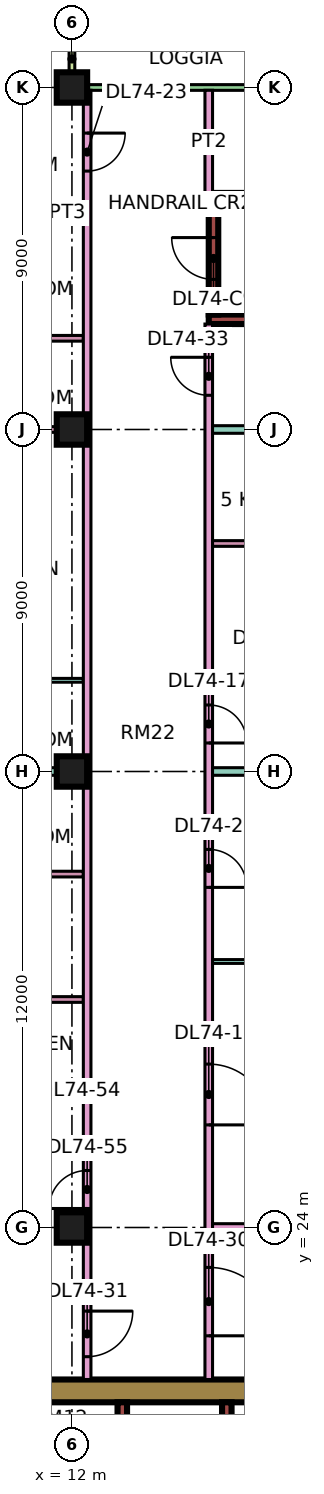
"""IFC4 building model, lengths in metres.
Left out: names, types, materials, properties, quantities, classifications, styles, units other than length and angle.
Written with IfcOpenShell. Run it as: python <this file> out.ifc"""

import sys

from ifc_helpers import new_model, si_unit, direction, frame, frame_2d, origin, origin_2d, place, context, subcontext, project, spatial, rectangle, extrude, element, fill, save


model = new_model("IFC4")
c1 = context("Model", 3, precision=1e-05, world=origin(), true_north=direction((0.0, 1.0)))
c2 = subcontext(c1, "Body", "Model", "MODEL_VIEW")
j1 = project(units=[si_unit("LENGTHUNIT", "METRE"), si_unit("PLANEANGLEUNIT", "RADIAN")], contexts=[c1])
p1 = place(None, origin())
s1 = spatial("IfcSite", under=j1, at=p1, CompositionType="ELEMENT")
p2 = place(p1, origin())
s2 = spatial("IfcBuilding", under=s1, at=p2, CompositionType="ELEMENT")
p3 = place(p2, frame((0.0, 0.0, 314.65)))
s3 = spatial("IfcBuildingStorey", under=s2, at=p3, CompositionType="ELEMENT", Elevation=314.65)
for number, where, z_axis, x_axis in (
    (1, (12.0, 24.0, 0.0), (0.0, 0.0, 1.0), (1.0, 0.0, 0.0)),
    (2, (12.0, 36.0, 0.0), (0.0, 0.0, 1.0), (1.0, 0.0, 0.0)),
    (3, (12.0, 45.0, 0.0), (0.0, 0.0, 1.0), (1.0, 0.0, 0.0)),
    (4, (12.0, 54.0, 0.0), (0.0, 0.0, 1.0), (1.0, 0.0, 0.0)),
):
    element("IfcColumn", number, at=place(p3, frame(where, z_axis=z_axis, x_axis=x_axis)), inside=s3, PredefinedType="COLUMN", context=c2, shape_type="SweptSolid", body=[
        extrude(rectangle(XDim=0.8, YDim=0.8, at=origin_2d()), origin(), (0.0, 0.0, 1.0), 3.75),
    ])
p4 = place(p3, frame((9.0, 19.7, 0.0), z_axis=(0.0, 0.0, 1.0), x_axis=(1.0, 0.0, 0.0)))
e5 = element("IfcWall", 5, at=p4, inside=s3, PredefinedType="SHEAR", context=c2, shape_type="SweptSolid", body=[
    extrude(rectangle(XDim=25.0, YDim=0.6, at=frame_2d((12.5, 0.0))), origin(), (0.0, 0.0, 1.0), 3.75),
])
p5 = place(p4, frame((19.1, 0.0, 0.0)))
e6 = element("IfcOpeningElement", 6, at=p5, cuts=e5, PredefinedType="OPENING", context=c2, shape_type="SweptSolid", body=[
    extrude(rectangle(XDim=1.8, YDim=2.4, at=frame_2d((0.9, 1.2))), frame((0.0, 0.31, 0.0), z_axis=(0.0, -1.0, 0.0), x_axis=(1.0, 0.0, 0.0)), (0.0, 0.0, 1.0), 0.62),
])
p6 = place(p3, frame((13.325, 7.6, 0.0), z_axis=(0.0, 0.0, 1.0), x_axis=(0.0, 1.0, 0.0)))
e7 = element("IfcWall", 7, at=p6, inside=s3, PredefinedType="SHEAR", context=c2, shape_type="SweptSolid", body=[
    extrude(rectangle(XDim=11.8, YDim=0.25, at=frame_2d((5.9, 0.0))), origin(), (0.0, 0.0, 1.0), 3.75),
])
p7 = place(p3, frame((16.075, 15.8, 0.0), z_axis=(0.0, 0.0, 1.0), x_axis=(0.0, 1.0, 0.0)))
e8 = element("IfcWall", 8, at=p7, inside=s3, PredefinedType="SHEAR", context=c2, shape_type="SweptSolid", body=[
    extrude(rectangle(XDim=3.6, YDim=0.25, at=frame_2d((1.8, 0.0))), origin(), (0.0, 0.0, 1.0), 3.75),
])
for number, where, z_axis, x_axis in (
    (9, (15.6, 47.9, 0.0), (0.0, 0.0, 1.0), (1.0, 0.0, 0.0)),
    (10, (15.6, 51.1, 0.0), (0.0, 0.0, 1.0), (1.0, 0.0, 0.0)),
):
    element("IfcWall", number, at=place(p3, frame(where, z_axis=z_axis, x_axis=x_axis)), inside=s3, PredefinedType="SHEAR", context=c2, shape_type="SweptSolid", body=[
        extrude(rectangle(XDim=7.0, YDim=0.25, at=frame_2d((3.5, 0.0))), origin(), (0.0, 0.0, 1.0), 3.75),
    ])
p8 = place(p3, frame((15.725, 48.025, 0.0), z_axis=(0.0, 0.0, 1.0), x_axis=(0.0, 1.0, 0.0)))
e11 = element("IfcWall", 11, at=p8, inside=s3, PredefinedType="SHEAR", context=c2, shape_type="SweptSolid", body=[
    extrude(rectangle(XDim=2.95, YDim=0.25, at=frame_2d((1.475, 0.0))), origin(), (0.0, 0.0, 1.0), 3.75),
])
p9 = place(p8, frame((0.925, 0.0, 0.0)))
e12 = element("IfcOpeningElement", 12, at=p9, cuts=e11, PredefinedType="OPENING", context=c2, shape_type="SweptSolid", body=[
    extrude(rectangle(XDim=1.1, YDim=2.2, at=frame_2d((0.55, 1.1))), frame((0.0, 0.135, 0.0), z_axis=(0.0, -1.0, 0.0), x_axis=(1.0, 0.0, 0.0)), (0.0, 0.0, 1.0), 0.27),
])
p10 = place(p3, frame((22.425, 54.0, 0.0), z_axis=(0.0, 0.0, 1.0), x_axis=(-1.0, 0.0, 0.0)))
e13 = element("IfcWall", 13, at=p10, inside=s3, PredefinedType="SOLIDWALL", context=c2, shape_type="SweptSolid", body=[
    extrude(rectangle(XDim=10.35, YDim=0.15, at=frame_2d((5.175, 0.0))), origin(), (0.0, 0.0, 1.0), 3.35),
])
p11 = place(p10, frame((1.012, 0.0, 0.45)))
e14 = element("IfcOpeningElement", 14, at=p11, cuts=e13, PredefinedType="OPENING", context=c2, shape_type="SweptSolid", body=[
    extrude(rectangle(XDim=4.8, YDim=2.4, at=frame_2d((2.4, 1.2))), frame((0.0, 0.085, 0.0), z_axis=(0.0, -1.0, 0.0), x_axis=(1.0, 0.0, 0.0)), (0.0, 0.0, 1.0), 0.17),
])
p12 = place(p3, frame((12.0, 55.5, 0.0), z_axis=(0.0, 0.0, 1.0), x_axis=(0.0, -1.0, 0.0)))
e15 = element("IfcWall", 15, at=p12, inside=s3, PredefinedType="SOLIDWALL", context=c2, shape_type="SweptSolid", body=[
    extrude(rectangle(XDim=1.5, YDim=0.15, at=frame_2d((0.75, 0.0))), origin(), (0.0, 0.0, 1.0), 3.35),
])
p13 = place(p3, frame((0.0, 36.0, 0.0), z_axis=(0.0, 0.0, 1.0), x_axis=(1.0, 0.0, 0.0)))
e16 = element("IfcWall", 16, at=p13, inside=s3, PredefinedType="PARTITIONING", context=c2, shape_type="SweptSolid", body=[
    extrude(rectangle(XDim=12.3, YDim=0.2, at=frame_2d((6.15, 0.0))), origin(), (0.0, 0.0, 1.0), 3.35),
])
p14 = place(p3, frame((0.074, 22.4, 0.0), z_axis=(0.0, 0.0, 1.0), x_axis=(1.0, 0.0, 0.0)))
e17 = element("IfcWall", 17, at=p14, inside=s3, PredefinedType="PARTITIONING", context=c2, shape_type="SweptSolid", body=[
    extrude(rectangle(XDim=12.226, YDim=0.2, at=frame_2d((6.113, 0.0))), origin(), (0.0, 0.0, 1.0), 3.35),
])
p15 = place(p3, frame((7.675, 27.6, 0.0), z_axis=(0.0, 0.0, 1.0), x_axis=(1.0, 0.0, 0.0)))
e18 = element("IfcWall", 18, at=p15, inside=s3, PredefinedType="PARTITIONING", context=c2, shape_type="SweptSolid", body=[
    extrude(rectangle(XDim=4.625, YDim=0.1, at=frame_2d((2.312, 0.0))), origin(), (0.0, 0.0, 1.0), 3.35),
])
p16 = place(p15, frame((1.875, 0.0, 0.0)))
e19 = element("IfcOpeningElement", 19, at=p16, cuts=e18, PredefinedType="OPENING", context=c2, shape_type="SweptSolid", body=[
    extrude(rectangle(XDim=0.9, YDim=2.1, at=frame_2d((0.45, 1.05))), frame((0.0, 0.06, 0.0), z_axis=(0.0, -1.0, 0.0), x_axis=(1.0, 0.0, 0.0)), (0.0, 0.0, 1.0), 0.12),
])
for number, where, z_axis, x_axis in (
    (20, (7.675, 30.0, 0.0), (0.0, 0.0, 1.0), (1.0, 0.0, 0.0)),
    (21, (7.675, 33.3, 0.0), (0.0, 0.0, 1.0), (1.0, 0.0, 0.0)),
):
    element("IfcWall", number, at=place(p3, frame(where, z_axis=z_axis, x_axis=x_axis)), inside=s3, PredefinedType="PARTITIONING", context=c2, shape_type="SweptSolid", body=[
        extrude(rectangle(XDim=4.625, YDim=0.15, at=frame_2d((2.312, 0.0))), origin(), (0.0, 0.0, 1.0), 3.35),
    ])
p17 = place(p3, frame((8.275, 38.4, 0.0), z_axis=(0.0, 0.0, 1.0), x_axis=(1.0, 0.0, 0.0)))
e22 = element("IfcWall", 22, at=p17, inside=s3, PredefinedType="PARTITIONING", context=c2, shape_type="SweptSolid", body=[
    extrude(rectangle(XDim=4.025, YDim=0.1, at=frame_2d((2.013, 0.0))), origin(), (0.0, 0.0, 1.0), 3.35),
])
for number, where, z_axis, x_axis in (
    (23, (8.275, 45.0, 0.0), (0.0, 0.0, 1.0), (1.0, 0.0, 0.0)),
    (24, (8.275, 47.4, 0.0), (0.0, 0.0, 1.0), (1.0, 0.0, 0.0)),
):
    element("IfcWall", number, at=place(p3, frame(where, z_axis=z_axis, x_axis=x_axis)), inside=s3, PredefinedType="PARTITIONING", context=c2, shape_type="SweptSolid", body=[
        extrude(rectangle(XDim=4.025, YDim=0.15, at=frame_2d((2.013, 0.0))), origin(), (0.0, 0.0, 1.0), 3.35),
    ])
p18 = place(p3, frame((8.275, 50.7, 0.0), z_axis=(0.0, 0.0, 1.0), x_axis=(1.0, 0.0, 0.0)))
e25 = element("IfcWall", 25, at=p18, inside=s3, PredefinedType="PARTITIONING", context=c2, shape_type="SweptSolid", body=[
    extrude(rectangle(XDim=4.025, YDim=0.1, at=frame_2d((2.013, 0.0))), origin(), (0.0, 0.0, 1.0), 3.35),
])
p19 = place(p18, frame((1.575, 0.0, 0.0)))
e26 = element("IfcOpeningElement", 26, at=p19, cuts=e25, PredefinedType="OPENING", context=c2, shape_type="SweptSolid", body=[
    extrude(rectangle(XDim=0.9, YDim=2.1, at=frame_2d((0.45, 1.05))), frame((0.0, 0.06, 0.0), z_axis=(0.0, -1.0, 0.0), x_axis=(1.0, 0.0, 0.0)), (0.0, 0.0, 1.0), 0.12),
])
p20 = place(p3, frame((12.4, 20.0, 0.0), z_axis=(0.0, 0.0, 1.0), x_axis=(0.0, 1.0, 0.0)))
e27 = element("IfcWall", 27, at=p20, inside=s3, PredefinedType="PARTITIONING", context=c2, shape_type="SweptSolid", body=[
    extrude(rectangle(XDim=33.926, YDim=0.2, at=frame_2d((16.963, 0.0))), origin(), (0.0, 0.0, 1.0), 3.35),
])
p21 = place(p20, frame((31.8, 0.0, 0.0)))
e28 = element("IfcOpeningElement", 28, at=p21, cuts=e27, PredefinedType="OPENING", context=c2, shape_type="SweptSolid", body=[
    extrude(rectangle(XDim=1.0, YDim=2.1, at=frame_2d((0.5, 1.05))), frame((0.0, 0.11, 0.0), z_axis=(0.0, -1.0, 0.0), x_axis=(1.0, 0.0, 0.0)), (0.0, 0.0, 1.0), 0.22),
])
p22 = place(p20, frame((0.6, 0.0, 0.0)))
e29 = element("IfcOpeningElement", 29, at=p22, cuts=e27, PredefinedType="OPENING", context=c2, shape_type="SweptSolid", body=[
    extrude(rectangle(XDim=1.2, YDim=2.1, at=frame_2d((0.6, 1.05))), frame((0.0, 0.11, 0.0), z_axis=(0.0, -1.0, 0.0), x_axis=(1.0, 0.0, 0.0)), (0.0, 0.0, 1.0), 0.22),
])
p23 = place(p20, frame((4.5, 0.0, 0.0)))
e30 = element("IfcOpeningElement", 30, at=p23, cuts=e27, PredefinedType="OPENING", context=c2, shape_type="SweptSolid", body=[
    extrude(rectangle(XDim=1.0, YDim=2.1, at=frame_2d((0.5, 1.05))), frame((0.0, 0.11, 0.0), z_axis=(0.0, -1.0, 0.0), x_axis=(1.0, 0.0, 0.0)), (0.0, 0.0, 1.0), 0.22),
])
p24 = place(p3, frame((15.6, 20.0, 0.0), z_axis=(0.0, 0.0, 1.0), x_axis=(0.0, 1.0, 0.0)))
e31 = element("IfcWall", 31, at=p24, inside=s3, PredefinedType="PARTITIONING", context=c2, shape_type="SweptSolid", body=[
    extrude(rectangle(XDim=27.775, YDim=0.2, at=frame_2d((13.887, 0.0))), origin(), (0.0, 0.0, 1.0), 3.35),
])
p25 = place(p24, frame((6.7, 0.0, 0.0)))
e32 = element("IfcOpeningElement", 32, at=p25, cuts=e31, PredefinedType="OPENING", context=c2, shape_type="SweptSolid", body=[
    extrude(rectangle(XDim=1.6, YDim=2.1, at=frame_2d((0.8, 1.05))), frame((0.0, 0.11, 0.0), z_axis=(0.0, -1.0, 0.0), x_axis=(1.0, 0.0, 0.0)), (0.0, 0.0, 1.0), 0.22),
])
p26 = place(p24, frame((12.95, 0.0, 0.0)))
e33 = element("IfcOpeningElement", 33, at=p26, cuts=e31, PredefinedType="OPENING", context=c2, shape_type="SweptSolid", body=[
    extrude(rectangle(XDim=1.0, YDim=2.1, at=frame_2d((0.5, 1.05))), frame((0.0, 0.11, 0.0), z_axis=(0.0, -1.0, 0.0), x_axis=(1.0, 0.0, 0.0)), (0.0, 0.0, 1.0), 0.22),
])
p27 = place(p24, frame((16.75, 0.0, 0.0)))
e34 = element("IfcOpeningElement", 34, at=p27, cuts=e31, PredefinedType="OPENING", context=c2, shape_type="SweptSolid", body=[
    extrude(rectangle(XDim=1.0, YDim=2.1, at=frame_2d((0.5, 1.05))), frame((0.0, 0.11, 0.0), z_axis=(0.0, -1.0, 0.0), x_axis=(1.0, 0.0, 0.0)), (0.0, 0.0, 1.0), 0.22),
])
p28 = place(p24, frame((1.15, 0.0, 0.0)))
e35 = element("IfcOpeningElement", 35, at=p28, cuts=e31, PredefinedType="OPENING", context=c2, shape_type="SweptSolid", body=[
    extrude(rectangle(XDim=1.8, YDim=2.1, at=frame_2d((0.9, 1.05))), frame((0.0, 0.11, 0.0), z_axis=(0.0, -1.0, 0.0), x_axis=(1.0, 0.0, 0.0)), (0.0, 0.0, 1.0), 0.22),
])
p29 = place(p24, frame((25.9, 0.0, 0.0)))
e36 = element("IfcOpeningElement", 36, at=p29, cuts=e31, PredefinedType="OPENING", context=c2, shape_type="SweptSolid", body=[
    extrude(rectangle(XDim=1.0, YDim=2.1, at=frame_2d((0.5, 1.05))), frame((0.0, 0.11, 0.0), z_axis=(0.0, -1.0, 0.0), x_axis=(1.0, 0.0, 0.0)), (0.0, 0.0, 1.0), 0.22),
])
p30 = place(p3, frame((15.6, 51.225, 0.0), z_axis=(0.0, 0.0, 1.0), x_axis=(0.0, 1.0, 0.0)))
e37 = element("IfcWall", 37, at=p30, inside=s3, PredefinedType="PARTITIONING", context=c2, shape_type="SweptSolid", body=[
    extrude(rectangle(XDim=2.701, YDim=0.2, at=frame_2d((1.351, 0.0))), origin(), (0.0, 0.0, 1.0), 3.35),
])
p31 = place(p3, frame((15.7, 24.0, 0.0), z_axis=(0.0, 0.0, 1.0), x_axis=(1.0, 0.0, 0.0)))
e38 = element("IfcWall", 38, at=p31, inside=s3, PredefinedType="PARTITIONING", context=c2, shape_type="SweptSolid", body=[
    extrude(rectangle(XDim=5.8, YDim=0.2, at=frame_2d((2.9, 0.0))), origin(), (0.0, 0.0, 1.0), 3.35),
])
p32 = place(p3, frame((15.7, 31.0, 0.0), z_axis=(0.0, 0.0, 1.0), x_axis=(1.0, 0.0, 0.0)))
e39 = element("IfcWall", 39, at=p32, inside=s3, PredefinedType="PARTITIONING", context=c2, shape_type="SweptSolid", body=[
    extrude(rectangle(XDim=5.8, YDim=0.1, at=frame_2d((2.9, 0.0))), origin(), (0.0, 0.0, 1.0), 3.35),
])
p33 = place(p3, frame((15.7, 36.0, 0.0), z_axis=(0.0, 0.0, 1.0), x_axis=(1.0, 0.0, 0.0)))
e40 = element("IfcWall", 40, at=p33, inside=s3, PredefinedType="PARTITIONING", context=c2, shape_type="SweptSolid", body=[
    extrude(rectangle(XDim=8.3, YDim=0.2, at=frame_2d((4.15, 0.0))), origin(), (0.0, 0.0, 1.0), 3.35),
])
p34 = place(p3, frame((15.7, 38.4, 0.0), z_axis=(0.0, 0.0, 1.0), x_axis=(1.0, 0.0, 0.0)))
e41 = element("IfcWall", 41, at=p34, inside=s3, PredefinedType="PARTITIONING", context=c2, shape_type="SweptSolid", body=[
    extrude(rectangle(XDim=3.125, YDim=0.15, at=frame_2d((1.562, 0.0))), origin(), (0.0, 0.0, 1.0), 3.35),
])
p35 = place(p34, frame((1.2, 0.0, 0.0)))
e42 = element("IfcOpeningElement", 42, at=p35, cuts=e41, PredefinedType="OPENING", context=c2, shape_type="SweptSolid", body=[
    extrude(rectangle(XDim=0.8, YDim=2.1, at=frame_2d((0.4, 1.05))), frame((0.0, 0.085, 0.0), z_axis=(0.0, -1.0, 0.0), x_axis=(1.0, 0.0, 0.0)), (0.0, 0.0, 1.0), 0.17),
])
p36 = place(p3, frame((15.7, 42.0, 0.0), z_axis=(0.0, 0.0, 1.0), x_axis=(1.0, 0.0, 0.0)))
e43 = element("IfcWall", 43, at=p36, inside=s3, PredefinedType="PARTITIONING", context=c2, shape_type="SweptSolid", body=[
    extrude(rectangle(XDim=3.125, YDim=0.15, at=frame_2d((1.562, 0.0))), origin(), (0.0, 0.0, 1.0), 3.35),
])
p37 = place(p3, frame((15.7, 45.0, 0.0), z_axis=(0.0, 0.0, 1.0), x_axis=(1.0, 0.0, 0.0)))
e44 = element("IfcWall", 44, at=p37, inside=s3, PredefinedType="PARTITIONING", context=c2, shape_type="SweptSolid", body=[
    extrude(rectangle(XDim=8.226, YDim=0.2, at=frame_2d((4.113, 0.0))), origin(), (0.0, 0.0, 1.0), 3.35),
])
p38 = place(p9, frame((1.1, 0.0, 0.0), z_axis=(0.0, 0.0, 1.0), x_axis=(-1.0, 0.0, 0.0)))
e45 = element("IfcDoor", 45, at=p38, inside=s3, OperationType="SINGLE_SWING_RIGHT", PredefinedType="DOOR", context=c2, shape_type="SweptSolid", body=[
    extrude(rectangle(XDim=1.1, YDim=2.2, at=frame_2d((0.55, 1.1))), frame((0.0, 0.025, 0.0), z_axis=(0.0, -1.0, 0.0), x_axis=(1.0, 0.0, 0.0)), (0.0, 0.0, 1.0), 0.05),
])
fill(e12, e45)
p39 = place(p25, frame((1.6, 0.0, 0.0), z_axis=(0.0, 0.0, 1.0), x_axis=(-1.0, 0.0, 0.0)))
e46 = element("IfcDoor", 46, at=p39, inside=s3, OperationType="DOUBLE_DOOR_SINGLE_SWING", PredefinedType="DOOR", context=c2, shape_type="SweptSolid", body=[
    extrude(rectangle(XDim=1.6, YDim=2.1, at=frame_2d((0.8, 1.05))), frame((0.0, 0.025, 0.0), z_axis=(0.0, -1.0, 0.0), x_axis=(1.0, 0.0, 0.0)), (0.0, 0.0, 1.0), 0.05),
])
fill(e32, e46)
p40 = place(p26, frame((1.0, 0.0, 0.0), z_axis=(0.0, 0.0, 1.0), x_axis=(-1.0, 0.0, 0.0)))
e47 = element("IfcDoor", 47, at=p40, inside=s3, OperationType="SINGLE_SWING_LEFT", PredefinedType="DOOR", context=c2, shape_type="SweptSolid", body=[
    extrude(rectangle(XDim=1.0, YDim=2.1, at=frame_2d((0.5, 1.05))), frame((0.0, 0.025, 0.0), z_axis=(0.0, -1.0, 0.0), x_axis=(1.0, 0.0, 0.0)), (0.0, 0.0, 1.0), 0.05),
])
fill(e33, e47)
p41 = place(p27, frame((1.0, 0.0, 0.0), z_axis=(0.0, 0.0, 1.0), x_axis=(-1.0, 0.0, 0.0)))
e48 = element("IfcDoor", 48, at=p41, inside=s3, OperationType="SINGLE_SWING_LEFT", PredefinedType="DOOR", context=c2, shape_type="SweptSolid", body=[
    extrude(rectangle(XDim=1.0, YDim=2.1, at=frame_2d((0.5, 1.05))), frame((0.0, 0.025, 0.0), z_axis=(0.0, -1.0, 0.0), x_axis=(1.0, 0.0, 0.0)), (0.0, 0.0, 1.0), 0.05),
])
fill(e34, e48)
p42 = place(p21, origin())
e49 = element("IfcDoor", 49, at=p42, inside=s3, OperationType="SINGLE_SWING_RIGHT", PredefinedType="DOOR", context=c2, shape_type="SweptSolid", body=[
    extrude(rectangle(XDim=1.0, YDim=2.1, at=frame_2d((0.5, 1.05))), frame((0.0, 0.025, 0.0), z_axis=(0.0, -1.0, 0.0), x_axis=(1.0, 0.0, 0.0)), (0.0, 0.0, 1.0), 0.05),
])
fill(e28, e49)
p43 = place(p28, frame((1.8, 0.0, 0.0), z_axis=(0.0, 0.0, 1.0), x_axis=(-1.0, 0.0, 0.0)))
e50 = element("IfcDoor", 50, at=p43, inside=s3, OperationType="DOUBLE_DOOR_SINGLE_SWING", PredefinedType="DOOR", context=c2, shape_type="SweptSolid", body=[
    extrude(rectangle(XDim=1.8, YDim=2.1, at=frame_2d((0.9, 1.05))), frame((0.0, 0.025, 0.0), z_axis=(0.0, -1.0, 0.0), x_axis=(1.0, 0.0, 0.0)), (0.0, 0.0, 1.0), 0.05),
])
fill(e35, e50)
p44 = place(p22, origin())
e51 = element("IfcDoor", 51, at=p44, inside=s3, OperationType="SINGLE_SWING_RIGHT", PredefinedType="DOOR", context=c2, shape_type="SweptSolid", body=[
    extrude(rectangle(XDim=1.2, YDim=2.1, at=frame_2d((0.6, 1.05))), frame((0.0, 0.025, 0.0), z_axis=(0.0, -1.0, 0.0), x_axis=(1.0, 0.0, 0.0)), (0.0, 0.0, 1.0), 0.05),
])
fill(e29, e51)
p45 = place(p29, frame((1.0, 0.0, 0.0), z_axis=(0.0, 0.0, 1.0), x_axis=(-1.0, 0.0, 0.0)))
e52 = element("IfcDoor", 52, at=p45, inside=s3, OperationType="SINGLE_SWING_RIGHT", PredefinedType="DOOR", context=c2, shape_type="SweptSolid", body=[
    extrude(rectangle(XDim=1.0, YDim=2.1, at=frame_2d((0.5, 1.05))), frame((0.0, 0.025, 0.0), z_axis=(0.0, -1.0, 0.0), x_axis=(1.0, 0.0, 0.0)), (0.0, 0.0, 1.0), 0.05),
])
fill(e36, e52)
p46 = place(p23, origin())
e53 = element("IfcDoor", 53, at=p46, inside=s3, OperationType="SINGLE_SWING_LEFT", PredefinedType="DOOR", context=c2, shape_type="SweptSolid", body=[
    extrude(rectangle(XDim=1.0, YDim=2.1, at=frame_2d((0.5, 1.05))), frame((0.0, 0.025, 0.0), z_axis=(0.0, -1.0, 0.0), x_axis=(1.0, 0.0, 0.0)), (0.0, 0.0, 1.0), 0.05),
])
fill(e30, e53)
save(model, sys.argv[1])
